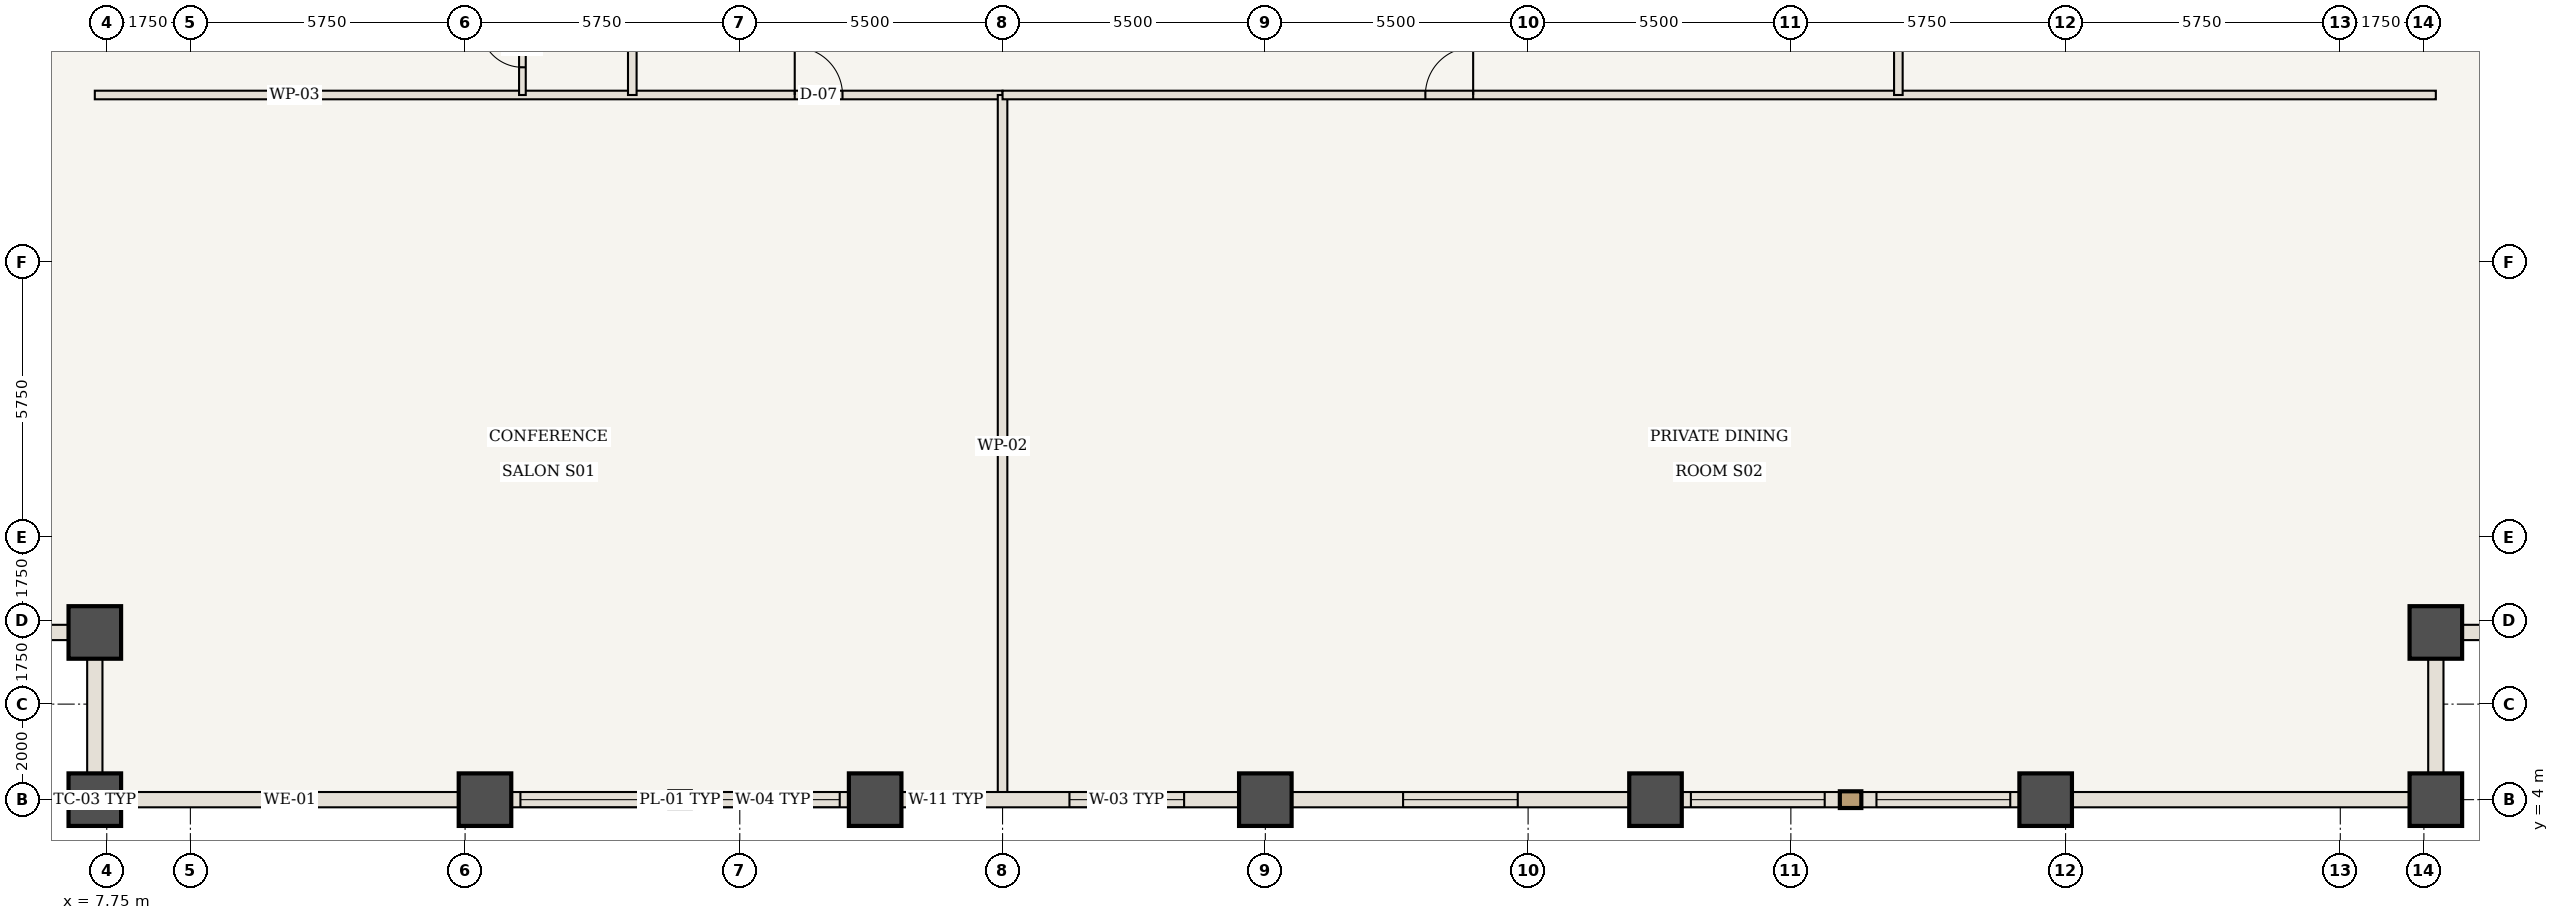
"""IFC4 building model, lengths in metres.
Left out: names, types, materials, properties, quantities, classifications, styles, units other than length and angle.
Written with IfcOpenShell. Run it as: python <this file> out.ifc"""

import sys

from ifc_helpers import new_model, si_unit, direction, frame, frame_2d, origin, origin_2d, place, context, subcontext, project, spatial, rectangle, extrude, element, fill, save


model = new_model("IFC4")
c1 = context("Model", 3, precision=1e-05, world=origin(), true_north=direction((0.0, 1.0)))
c2 = subcontext(c1, "Body", "Model", "MODEL_VIEW")
j1 = project(units=[si_unit("LENGTHUNIT", "METRE"), si_unit("PLANEANGLEUNIT", "RADIAN")], contexts=[c1])
p1 = place(None, origin())
s1 = spatial("IfcSite", under=j1, at=p1, CompositionType="ELEMENT")
p2 = place(p1, origin())
s2 = spatial("IfcBuilding", under=s1, at=p2, CompositionType="ELEMENT")
p3 = place(p2, frame((0.0, 0.0, 85.75)))
s3 = spatial("IfcBuildingStorey", under=s2, at=p3, CompositionType="ELEMENT", Elevation=85.75)
for number, where, z_axis, x_axis in (
    (1, (7.5, 4.0, 0.0), (0.0, 0.0, 1.0), (1.0, 0.0, 0.0)),
    (2, (7.5, 7.5, 0.0), (0.0, 0.0, 1.0), (1.0, 0.0, 0.0)),
    (3, (56.5, 4.0, 0.0), (0.0, 0.0, 1.0), (1.0, 0.0, 0.0)),
    (4, (56.5, 7.5, 0.0), (0.0, 0.0, 1.0), (1.0, 0.0, 0.0)),
    (5, (15.667, 4.0, 0.0), (0.0, 0.0, 1.0), (1.0, 0.0, 0.0)),
    (6, (23.833, 4.0, 0.0), (0.0, 0.0, 1.0), (1.0, 0.0, 0.0)),
    (7, (32.0, 4.0, 0.0), (0.0, 0.0, 1.0), (1.0, 0.0, 0.0)),
    (8, (40.167, 4.0, 0.0), (0.0, 0.0, 1.0), (1.0, 0.0, 0.0)),
    (9, (48.333, 4.0, 0.0), (0.0, 0.0, 1.0), (1.0, 0.0, 0.0)),
):
    element("IfcColumn", number, at=place(p3, frame(where, z_axis=z_axis, x_axis=x_axis)), inside=s3, PredefinedType="COLUMN", context=c2, shape_type="SweptSolid", body=[
        extrude(rectangle(XDim=1.1, YDim=1.1, at=origin_2d()), origin(), (0.0, 0.0, 1.0), 3.5),
    ])
p4 = place(p3, frame((7.5, 18.75, 0.0), z_axis=(0.0, 0.0, 1.0), x_axis=(1.0, 0.0, 0.0)))
e10 = element("IfcWall", 10, at=p4, inside=s3, PredefinedType="STANDARD", context=c2, shape_type="SweptSolid", body=[
    extrude(rectangle(XDim=19.0, YDim=0.18, at=frame_2d((9.5, 0.0))), origin(), (0.0, 0.0, 1.0), 3.32),
])
p5 = place(p4, frame((14.65, 0.0, 0.0)))
e11 = element("IfcOpeningElement", 11, at=p5, cuts=e10, PredefinedType="OPENING", context=c2, shape_type="SweptSolid", body=[
    extrude(rectangle(XDim=1.0, YDim=2.15, at=frame_2d((0.5, 1.075))), frame((0.0, 0.1, 0.0), z_axis=(0.0, -1.0, 0.0), x_axis=(1.0, 0.0, 0.0)), (0.0, 0.0, 1.0), 0.2),
])
p6 = place(p3, frame((26.5, 4.06, 0.0), z_axis=(0.0, 0.0, 1.0), x_axis=(0.0, 1.0, 0.0)))
e12 = element("IfcWall", 12, at=p6, inside=s3, PredefinedType="STANDARD", context=c2, shape_type="SweptSolid", body=[
    extrude(rectangle(XDim=14.69, YDim=0.2, at=frame_2d((7.345, 0.0))), origin(), (0.0, 0.0, 1.0), 3.32),
])
p7 = place(p3, frame((26.5, 18.75, 0.0), z_axis=(0.0, 0.0, 1.0), x_axis=(1.0, 0.0, 0.0)))
e13 = element("IfcWall", 13, at=p7, inside=s3, PredefinedType="STANDARD", context=c2, shape_type="SweptSolid", body=[
    extrude(rectangle(XDim=30.0, YDim=0.18, at=frame_2d((15.0, 0.0))), origin(), (0.0, 0.0, 1.0), 3.32),
])
p8 = place(p7, frame((8.85, 0.0, 0.0)))
e14 = element("IfcOpeningElement", 14, at=p8, cuts=e13, PredefinedType="OPENING", context=c2, shape_type="SweptSolid", body=[
    extrude(rectangle(XDim=1.0, YDim=2.15, at=frame_2d((0.5, 1.075))), frame((0.0, 0.1, 0.0), z_axis=(0.0, -1.0, 0.0), x_axis=(1.0, 0.0, 0.0)), (0.0, 0.0, 1.0), 0.2),
])
p9 = place(p3, frame((16.45, 18.75, 0.0), z_axis=(0.0, 0.0, 1.0), x_axis=(0.0, 1.0, 0.0)))
e15 = element("IfcWall", 15, at=p9, inside=s3, PredefinedType="STANDARD", context=c2, shape_type="SweptSolid", body=[
    extrude(rectangle(XDim=1.95, YDim=0.14, at=frame_2d((0.975, 0.0))), origin(), (0.0, 0.0, 1.0), 3.32),
])
p10 = place(p9, frame((0.58, 0.0, 0.0)))
e16 = element("IfcOpeningElement", 16, at=p10, cuts=e15, PredefinedType="OPENING", context=c2, shape_type="SweptSolid", body=[
    extrude(rectangle(XDim=0.88, YDim=2.1, at=frame_2d((0.44, 1.05))), frame((0.0, 0.08, 0.0), z_axis=(0.0, -1.0, 0.0), x_axis=(1.0, 0.0, 0.0)), (0.0, 0.0, 1.0), 0.16),
])
p11 = place(p3, frame((18.75, 18.75, 0.0), z_axis=(0.0, 0.0, 1.0), x_axis=(0.0, 1.0, 0.0)))
e17 = element("IfcWall", 17, at=p11, inside=s3, PredefinedType="STANDARD", context=c2, shape_type="SweptSolid", body=[
    extrude(rectangle(XDim=4.75, YDim=0.18, at=frame_2d((2.375, 0.0))), origin(), (0.0, 0.0, 1.0), 3.32),
])
p12 = place(p11, frame((2.8, 0.0, 0.0)))
e18 = element("IfcOpeningElement", 18, at=p12, cuts=e17, PredefinedType="OPENING", context=c2, shape_type="SweptSolid", body=[
    extrude(rectangle(XDim=1.0, YDim=2.15, at=frame_2d((0.5, 1.075))), frame((0.0, 0.1, 0.0), z_axis=(0.0, -1.0, 0.0), x_axis=(1.0, 0.0, 0.0)), (0.0, 0.0, 1.0), 0.2),
])
p13 = place(p3, frame((45.25, 18.75, 0.0), z_axis=(0.0, 0.0, 1.0), x_axis=(0.0, 1.0, 0.0)))
e19 = element("IfcWall", 19, at=p13, inside=s3, PredefinedType="STANDARD", context=c2, shape_type="SweptSolid", body=[
    extrude(rectangle(XDim=12.25, YDim=0.18, at=frame_2d((6.125, 0.0))), origin(), (0.0, 0.0, 1.0), 3.32),
])
p14 = place(p13, frame((5.625, 0.0, 0.0)))
e20 = element("IfcOpeningElement", 20, at=p14, cuts=e19, PredefinedType="OPENING", context=c2, shape_type="SweptSolid", body=[
    extrude(rectangle(XDim=1.0, YDim=2.15, at=frame_2d((0.5, 1.075))), frame((0.0, 0.1, 0.0), z_axis=(0.0, -1.0, 0.0), x_axis=(1.0, 0.0, 0.0)), (0.0, 0.0, 1.0), 0.2),
])
p15 = place(p3, frame((15.667, 4.0, 0.0), z_axis=(0.0, 0.0, 1.0), x_axis=(-1.0, 0.0, 0.0)))
e21 = element("IfcWall", 21, at=p15, inside=s3, PredefinedType="USERDEFINED", context=c2, shape_type="SweptSolid", body=[
    extrude(rectangle(XDim=8.167, YDim=0.32, at=frame_2d((4.083, 0.0))), origin(), (0.0, 0.0, 1.0), 2.52),
])
p16 = place(p3, frame((23.833, 4.0, 0.0), z_axis=(0.0, 0.0, 1.0), x_axis=(-1.0, 0.0, 0.0)))
e22 = element("IfcWall", 22, at=p16, inside=s3, PredefinedType="USERDEFINED", context=c2, shape_type="SweptSolid", body=[
    extrude(rectangle(XDim=8.167, YDim=0.32, at=frame_2d((4.083, 0.0))), origin(), (0.0, 0.0, 1.0), 2.52),
])
p17 = place(p16, frame((0.742, 0.0, 0.85)))
e23 = element("IfcOpeningElement", 23, at=p17, cuts=e22, PredefinedType="OPENING", context=c2, shape_type="SweptSolid", body=[
    extrude(rectangle(XDim=2.8, YDim=1.47, at=frame_2d((1.4, 0.735))), frame((0.0, 0.17, 0.0), z_axis=(0.0, -1.0, 0.0), x_axis=(1.0, 0.0, 0.0)), (0.0, 0.0, 1.0), 0.34),
])
p18 = place(p16, frame((4.625, 0.0, 0.85)))
e24 = element("IfcOpeningElement", 24, at=p18, cuts=e22, PredefinedType="OPENING", context=c2, shape_type="SweptSolid", body=[
    extrude(rectangle(XDim=2.8, YDim=1.47, at=frame_2d((1.4, 0.735))), frame((0.0, 0.17, 0.0), z_axis=(0.0, -1.0, 0.0), x_axis=(1.0, 0.0, 0.0)), (0.0, 0.0, 1.0), 0.34),
])
p19 = place(p3, frame((32.0, 4.0, 0.0), z_axis=(0.0, 0.0, 1.0), x_axis=(-1.0, 0.0, 0.0)))
e25 = element("IfcWall", 25, at=p19, inside=s3, PredefinedType="USERDEFINED", context=c2, shape_type="SweptSolid", body=[
    extrude(rectangle(XDim=8.167, YDim=0.32, at=frame_2d((4.083, 0.0))), origin(), (0.0, 0.0, 1.0), 2.52),
])
p20 = place(p19, frame((1.7, 0.0, 0.85)))
e26 = element("IfcOpeningElement", 26, at=p20, cuts=e25, PredefinedType="OPENING", context=c2, shape_type="SweptSolid", body=[
    extrude(rectangle(XDim=2.4, YDim=1.47, at=frame_2d((1.2, 0.735))), frame((0.0, 0.17, 0.0), z_axis=(0.0, -1.0, 0.0), x_axis=(1.0, 0.0, 0.0)), (0.0, 0.0, 1.0), 0.34),
])
p21 = place(p19, frame((5.883, 0.0, 0.85)))
e27 = element("IfcOpeningElement", 27, at=p21, cuts=e25, PredefinedType="OPENING", context=c2, shape_type="SweptSolid", body=[
    extrude(rectangle(XDim=1.6, YDim=1.47, at=frame_2d((0.8, 0.735))), frame((0.0, 0.17, 0.0), z_axis=(0.0, -1.0, 0.0), x_axis=(1.0, 0.0, 0.0)), (0.0, 0.0, 1.0), 0.34),
])
p22 = place(p3, frame((40.167, 4.0, 0.0), z_axis=(0.0, 0.0, 1.0), x_axis=(-1.0, 0.0, 0.0)))
e28 = element("IfcWall", 28, at=p22, inside=s3, PredefinedType="USERDEFINED", context=c2, shape_type="SweptSolid", body=[
    extrude(rectangle(XDim=8.167, YDim=0.32, at=frame_2d((4.083, 0.0))), origin(), (0.0, 0.0, 1.0), 2.52),
])
p23 = place(p22, frame((2.883, 0.0, 0.85)))
e29 = element("IfcOpeningElement", 29, at=p23, cuts=e28, PredefinedType="OPENING", context=c2, shape_type="SweptSolid", body=[
    extrude(rectangle(XDim=2.4, YDim=1.47, at=frame_2d((1.2, 0.735))), frame((0.0, 0.17, 0.0), z_axis=(0.0, -1.0, 0.0), x_axis=(1.0, 0.0, 0.0)), (0.0, 0.0, 1.0), 0.34),
])
p24 = place(p3, frame((48.333, 4.0, 0.0), z_axis=(0.0, 0.0, 1.0), x_axis=(-1.0, 0.0, 0.0)))
e30 = element("IfcWall", 30, at=p24, inside=s3, PredefinedType="USERDEFINED", context=c2, shape_type="SweptSolid", body=[
    extrude(rectangle(XDim=8.167, YDim=0.32, at=frame_2d((4.083, 0.0))), origin(), (0.0, 0.0, 1.0), 2.52),
])
p25 = place(p24, frame((0.742, 0.0, 0.85)))
e31 = element("IfcOpeningElement", 31, at=p25, cuts=e30, PredefinedType="OPENING", context=c2, shape_type="SweptSolid", body=[
    extrude(rectangle(XDim=2.8, YDim=1.47, at=frame_2d((1.4, 0.735))), frame((0.0, 0.17, 0.0), z_axis=(0.0, -1.0, 0.0), x_axis=(1.0, 0.0, 0.0)), (0.0, 0.0, 1.0), 0.34),
])
p26 = place(p24, frame((4.625, 0.0, 0.85)))
e32 = element("IfcOpeningElement", 32, at=p26, cuts=e30, PredefinedType="OPENING", context=c2, shape_type="SweptSolid", body=[
    extrude(rectangle(XDim=2.8, YDim=1.47, at=frame_2d((1.4, 0.735))), frame((0.0, 0.17, 0.0), z_axis=(0.0, -1.0, 0.0), x_axis=(1.0, 0.0, 0.0)), (0.0, 0.0, 1.0), 0.34),
])
p27 = place(p3, frame((56.5, 4.0, 0.0), z_axis=(0.0, 0.0, 1.0), x_axis=(-1.0, 0.0, 0.0)))
e33 = element("IfcWall", 33, at=p27, inside=s3, PredefinedType="USERDEFINED", context=c2, shape_type="SweptSolid", body=[
    extrude(rectangle(XDim=8.167, YDim=0.32, at=frame_2d((4.083, 0.0))), origin(), (0.0, 0.0, 1.0), 2.52),
])
for number, where, z_axis, x_axis in (
    (34, (7.5, 4.0, 0.0), (0.0, 0.0, 1.0), (0.0, 1.0, 0.0)),
    (35, (7.5, 7.5, 0.0), (0.0, 0.0, 1.0), (-1.0, 0.0, 0.0)),
    (36, (56.5, 7.5, 0.0), (0.0, 0.0, 1.0), (0.0, -1.0, 0.0)),
    (37, (60.0, 7.5, 0.0), (0.0, 0.0, 1.0), (-1.0, 0.0, 0.0)),
):
    element("IfcWall", number, at=place(p3, frame(where, z_axis=z_axis, x_axis=x_axis)), inside=s3, PredefinedType="USERDEFINED", context=c2, shape_type="SweptSolid", body=[
        extrude(rectangle(XDim=3.5, YDim=0.32, at=frame_2d((1.75, 0.0))), origin(), (0.0, 0.0, 1.0), 2.52),
    ])
p28 = place(p5, origin())
e38 = element("IfcDoor", 38, at=p28, inside=s3, OperationType="SINGLE_SWING_LEFT", PredefinedType="DOOR", context=c2, shape_type="SweptSolid", body=[
    extrude(rectangle(XDim=1.0, YDim=2.15, at=frame_2d((0.5, 1.075))), frame((0.0, 0.025, 0.0), z_axis=(0.0, -1.0, 0.0), x_axis=(1.0, 0.0, 0.0)), (0.0, 0.0, 1.0), 0.05),
])
fill(e11, e38)
p29 = place(p8, origin())
e39 = element("IfcDoor", 39, at=p29, inside=s3, OperationType="SINGLE_SWING_RIGHT", PredefinedType="DOOR", context=c2, shape_type="SweptSolid", body=[
    extrude(rectangle(XDim=1.0, YDim=2.15, at=frame_2d((0.5, 1.075))), frame((0.0, 0.025, 0.0), z_axis=(0.0, -1.0, 0.0), x_axis=(1.0, 0.0, 0.0)), (0.0, 0.0, 1.0), 0.05),
])
fill(e14, e39)
p30 = place(p10, origin())
e40 = element("IfcDoor", 40, at=p30, inside=s3, OperationType="SINGLE_SWING_RIGHT", PredefinedType="DOOR", context=c2, shape_type="SweptSolid", body=[
    extrude(rectangle(XDim=0.88, YDim=2.1, at=frame_2d((0.44, 1.05))), frame((0.0, 0.025, 0.0), z_axis=(0.0, -1.0, 0.0), x_axis=(1.0, 0.0, 0.0)), (0.0, 0.0, 1.0), 0.05),
])
fill(e16, e40)
p31 = place(p17, origin())
e41 = element("IfcWindow", 41, at=p31, inside=s3, PartitioningType="SINGLE_PANEL", PredefinedType="WINDOW", context=c2, shape_type="SweptSolid", body=[
    extrude(rectangle(XDim=2.8, YDim=1.47, at=frame_2d((1.4, 0.735))), frame((0.0, 0.03, 0.0), z_axis=(0.0, -1.0, 0.0), x_axis=(1.0, 0.0, 0.0)), (0.0, 0.0, 1.0), 0.06),
])
fill(e23, e41)
p32 = place(p18, origin())
e42 = element("IfcWindow", 42, at=p32, inside=s3, PartitioningType="SINGLE_PANEL", PredefinedType="WINDOW", context=c2, shape_type="SweptSolid", body=[
    extrude(rectangle(XDim=2.8, YDim=1.47, at=frame_2d((1.4, 0.735))), frame((0.0, 0.03, 0.0), z_axis=(0.0, -1.0, 0.0), x_axis=(1.0, 0.0, 0.0)), (0.0, 0.0, 1.0), 0.06),
])
fill(e24, e42)
p33 = place(p20, origin())
e43 = element("IfcWindow", 43, at=p33, inside=s3, PartitioningType="SINGLE_PANEL", PredefinedType="WINDOW", context=c2, shape_type="SweptSolid", body=[
    extrude(rectangle(XDim=2.4, YDim=1.47, at=frame_2d((1.2, 0.735))), frame((0.0, 0.03, 0.0), z_axis=(0.0, -1.0, 0.0), x_axis=(1.0, 0.0, 0.0)), (0.0, 0.0, 1.0), 0.06),
])
fill(e26, e43)
p34 = place(p21, origin())
e44 = element("IfcWindow", 44, at=p34, inside=s3, PartitioningType="SINGLE_PANEL", PredefinedType="WINDOW", context=c2, shape_type="SweptSolid", body=[
    extrude(rectangle(XDim=1.6, YDim=1.47, at=frame_2d((0.8, 0.735))), frame((0.0, 0.03, 0.0), z_axis=(0.0, -1.0, 0.0), x_axis=(1.0, 0.0, 0.0)), (0.0, 0.0, 1.0), 0.06),
])
fill(e27, e44)
p35 = place(p23, origin())
e45 = element("IfcWindow", 45, at=p35, inside=s3, PartitioningType="SINGLE_PANEL", PredefinedType="WINDOW", context=c2, shape_type="SweptSolid", body=[
    extrude(rectangle(XDim=2.4, YDim=1.47, at=frame_2d((1.2, 0.735))), frame((0.0, 0.03, 0.0), z_axis=(0.0, -1.0, 0.0), x_axis=(1.0, 0.0, 0.0)), (0.0, 0.0, 1.0), 0.06),
])
fill(e29, e45)
p36 = place(p25, origin())
e46 = element("IfcWindow", 46, at=p36, inside=s3, PartitioningType="SINGLE_PANEL", PredefinedType="WINDOW", context=c2, shape_type="SweptSolid", body=[
    extrude(rectangle(XDim=2.8, YDim=1.47, at=frame_2d((1.4, 0.735))), frame((0.0, 0.03, 0.0), z_axis=(0.0, -1.0, 0.0), x_axis=(1.0, 0.0, 0.0)), (0.0, 0.0, 1.0), 0.06),
])
fill(e31, e46)
p37 = place(p26, origin())
e47 = element("IfcWindow", 47, at=p37, inside=s3, PartitioningType="SINGLE_PANEL", PredefinedType="WINDOW", context=c2, shape_type="SweptSolid", body=[
    extrude(rectangle(XDim=2.8, YDim=1.47, at=frame_2d((1.4, 0.735))), frame((0.0, 0.03, 0.0), z_axis=(0.0, -1.0, 0.0), x_axis=(1.0, 0.0, 0.0)), (0.0, 0.0, 1.0), 0.06),
])
fill(e32, e47)
save(model, sys.argv[1])
